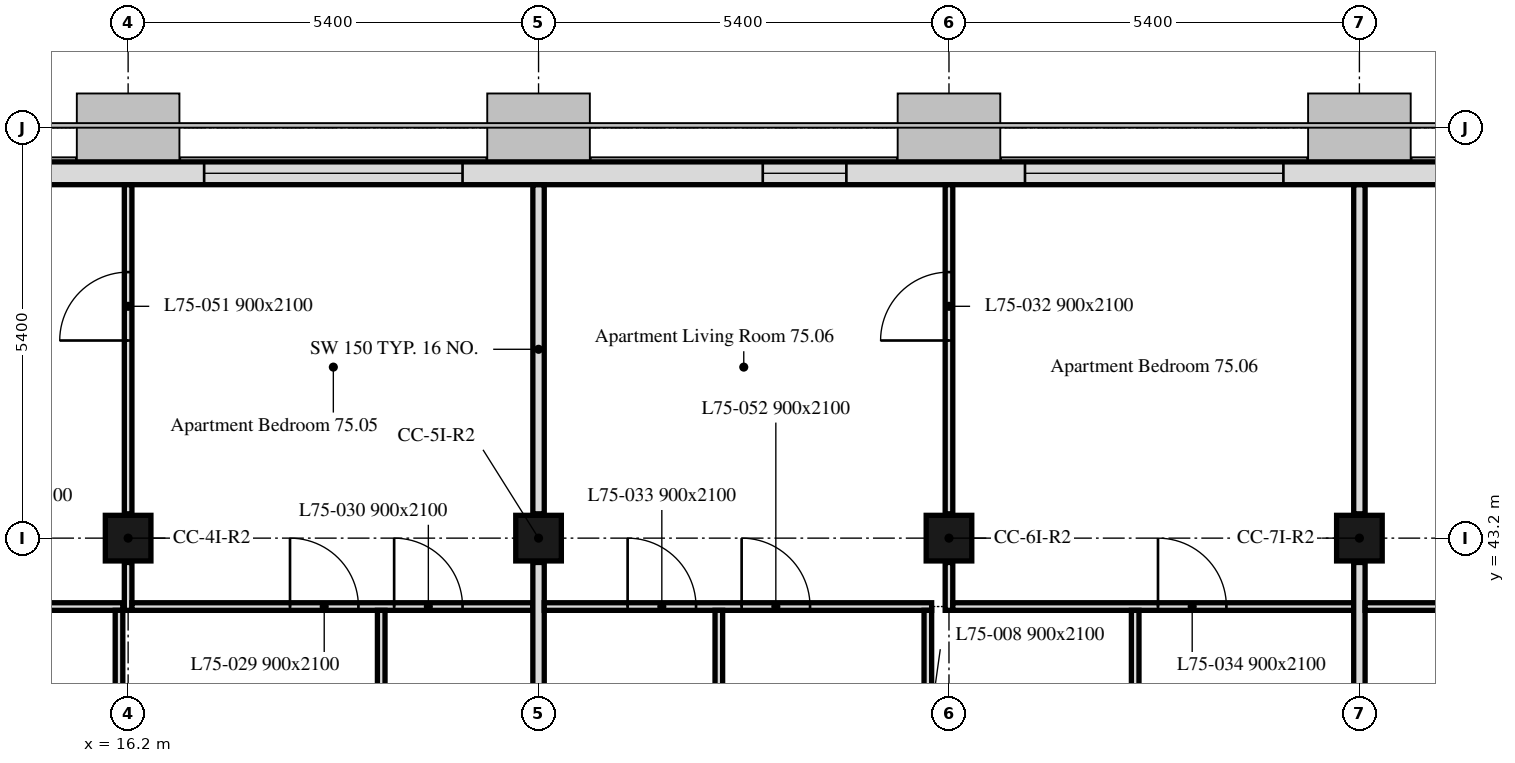
"""IFC4 building model, lengths in metres.
Left out: names, types, materials, properties, quantities, classifications, styles, units other than length and angle.
Written with IfcOpenShell. Run it as: python <this file> out.ifc"""

import sys

from ifc_helpers import new_model, si_unit, direction, frame, frame_2d, origin, origin_2d, place, context, subcontext, project, spatial, rectangle, extrude, element, fill, save


model = new_model("IFC4")
c1 = context("Model", 3, precision=1e-05, world=origin(), true_north=direction((0.0, 1.0)))
c2 = subcontext(c1, "Body", "Model", "MODEL_VIEW")
j1 = project(units=[si_unit("LENGTHUNIT", "METRE"), si_unit("PLANEANGLEUNIT", "RADIAN")], contexts=[c1])
p1 = place(None, origin())
s1 = spatial("IfcSite", under=j1, at=p1, CompositionType="ELEMENT")
p2 = place(p1, origin())
s2 = spatial("IfcBuilding", under=s1, at=p2, CompositionType="ELEMENT")
p3 = place(p2, frame((0.0, 0.0, 301.6)))
s3 = spatial("IfcBuildingStorey", under=s2, at=p3, CompositionType="ELEMENT", Elevation=301.6)
for number, where, z_axis, x_axis in (
    (1, (16.2, 43.2, 0.0), (0.0, 0.0, 1.0), (1.0, 0.0, 0.0)),
    (2, (21.6, 43.2, 0.0), (0.0, 0.0, 1.0), (1.0, 0.0, 0.0)),
    (3, (27.0, 43.2, 0.0), (0.0, 0.0, 1.0), (1.0, 0.0, 0.0)),
    (4, (32.4, 43.2, 0.0), (0.0, 0.0, 1.0), (1.0, 0.0, 0.0)),
):
    element("IfcColumn", number, at=place(p3, frame(where, z_axis=z_axis, x_axis=x_axis)), inside=s3, PredefinedType="COLUMN", context=c2, shape_type="SweptSolid", body=[
        extrude(rectangle(XDim=0.6, YDim=0.6, at=origin_2d()), origin(), (0.0, 0.0, 1.0), 3.0),
    ])
p4 = place(p3, frame((43.014, 48.0, 0.0), z_axis=(0.0, 0.0, 1.0), x_axis=(-1.0, 0.0, 0.0)))
e5 = element("IfcWall", 5, at=p4, inside=s3, PredefinedType="SOLIDWALL", context=c2, shape_type="SweptSolid", body=[
    extrude(rectangle(XDim=32.027, YDim=0.3, at=frame_2d((16.014, 0.0))), origin(), (0.0, 0.0, 1.0), 3.0),
])
p5 = place(p4, frame((0.814, 0.0, 0.9)))
e6 = element("IfcOpeningElement", 6, at=p5, cuts=e5, PredefinedType="OPENING", context=c2, shape_type="SweptSolid", body=[
    extrude(rectangle(XDim=3.4, YDim=1.7, at=frame_2d((1.7, 0.85))), frame((0.0, 0.16, 0.0), z_axis=(0.0, -1.0, 0.0), x_axis=(1.0, 0.0, 0.0)), (0.0, 0.0, 1.0), 0.32),
])
p6 = place(p4, frame((6.564, 0.0, 0.9)))
e7 = element("IfcOpeningElement", 7, at=p6, cuts=e5, PredefinedType="OPENING", context=c2, shape_type="SweptSolid", body=[
    extrude(rectangle(XDim=1.1, YDim=1.7, at=frame_2d((0.55, 0.85))), frame((0.0, 0.16, 0.0), z_axis=(0.0, -1.0, 0.0), x_axis=(1.0, 0.0, 0.0)), (0.0, 0.0, 1.0), 0.32),
])
p7 = place(p4, frame((11.614, 0.0, 0.9)))
e8 = element("IfcOpeningElement", 8, at=p7, cuts=e5, PredefinedType="OPENING", context=c2, shape_type="SweptSolid", body=[
    extrude(rectangle(XDim=3.4, YDim=1.7, at=frame_2d((1.7, 0.85))), frame((0.0, 0.16, 0.0), z_axis=(0.0, -1.0, 0.0), x_axis=(1.0, 0.0, 0.0)), (0.0, 0.0, 1.0), 0.32),
])
p8 = place(p4, frame((17.364, 0.0, 0.9)))
e9 = element("IfcOpeningElement", 9, at=p8, cuts=e5, PredefinedType="OPENING", context=c2, shape_type="SweptSolid", body=[
    extrude(rectangle(XDim=1.1, YDim=1.7, at=frame_2d((0.55, 0.85))), frame((0.0, 0.16, 0.0), z_axis=(0.0, -1.0, 0.0), x_axis=(1.0, 0.0, 0.0)), (0.0, 0.0, 1.0), 0.32),
])
p9 = place(p4, frame((22.414, 0.0, 0.9)))
e10 = element("IfcOpeningElement", 10, at=p9, cuts=e5, PredefinedType="OPENING", context=c2, shape_type="SweptSolid", body=[
    extrude(rectangle(XDim=3.4, YDim=1.7, at=frame_2d((1.7, 0.85))), frame((0.0, 0.16, 0.0), z_axis=(0.0, -1.0, 0.0), x_axis=(1.0, 0.0, 0.0)), (0.0, 0.0, 1.0), 0.32),
])
p10 = place(p4, frame((28.164, 0.0, 0.9)))
e11 = element("IfcOpeningElement", 11, at=p10, cuts=e5, PredefinedType="OPENING", context=c2, shape_type="SweptSolid", body=[
    extrude(rectangle(XDim=1.1, YDim=1.7, at=frame_2d((0.55, 0.85))), frame((0.0, 0.16, 0.0), z_axis=(0.0, -1.0, 0.0), x_axis=(1.0, 0.0, 0.0)), (0.0, 0.0, 1.0), 0.32),
])
p11 = place(p3, frame((6.151, 42.3, 0.0), z_axis=(0.0, 0.0, 1.0), x_axis=(1.0, 0.0, 0.0)))
e12 = element("IfcWall", 12, at=p11, inside=s3, PredefinedType="PARTITIONING", context=c2, shape_type="SweptSolid", body=[
    extrude(rectangle(XDim=9.979, YDim=0.1, at=frame_2d((4.99, 0.0))), origin(), (0.0, 0.0, 1.0), 3.0),
])
p12 = place(p11, frame((7.889, 0.0, 0.0)))
e13 = element("IfcOpeningElement", 13, at=p12, cuts=e12, PredefinedType="OPENING", context=c2, shape_type="SweptSolid", body=[
    extrude(rectangle(XDim=0.9, YDim=2.1, at=frame_2d((0.45, 1.05))), frame((0.0, 0.05, 0.0), z_axis=(0.0, -1.0, 0.0), x_axis=(1.0, 0.0, 0.0)), (0.0, 0.0, 1.0), 0.1),
])
p13 = place(p11, frame((1.019, 0.0, 0.0)))
e14 = element("IfcOpeningElement", 14, at=p13, cuts=e12, PredefinedType="OPENING", context=c2, shape_type="SweptSolid", body=[
    extrude(rectangle(XDim=0.9, YDim=2.1, at=frame_2d((0.45, 1.05))), frame((0.0, 0.05, 0.0), z_axis=(0.0, -1.0, 0.0), x_axis=(1.0, 0.0, 0.0)), (0.0, 0.0, 1.0), 0.1),
])
p14 = place(p11, frame((2.389, 0.0, 0.0)))
e15 = element("IfcOpeningElement", 15, at=p14, cuts=e12, PredefinedType="OPENING", context=c2, shape_type="SweptSolid", body=[
    extrude(rectangle(XDim=0.9, YDim=2.1, at=frame_2d((0.45, 1.05))), frame((0.0, 0.05, 0.0), z_axis=(0.0, -1.0, 0.0), x_axis=(1.0, 0.0, 0.0)), (0.0, 0.0, 1.0), 0.1),
])
p15 = place(p3, frame((16.2, 42.25, 0.0), z_axis=(0.0, 0.0, 1.0), x_axis=(0.0, 1.0, 0.0)))
e16 = element("IfcWall", 16, at=p15, inside=s3, PredefinedType="PARTITIONING", context=c2, shape_type="SweptSolid", body=[
    extrude(rectangle(XDim=0.63, YDim=0.1, at=frame_2d((0.315, 0.0))), origin(), (0.0, 0.0, 1.0), 2.4),
])
p16 = place(p3, frame((16.2, 43.52, 0.0), z_axis=(0.0, 0.0, 1.0), x_axis=(0.0, 1.0, 0.0)))
e17 = element("IfcWall", 17, at=p16, inside=s3, PredefinedType="PARTITIONING", context=c2, shape_type="SweptSolid", body=[
    extrude(rectangle(XDim=4.329, YDim=0.1, at=frame_2d((2.165, 0.0))), origin(), (0.0, 0.0, 1.0), 2.4),
])
p17 = place(p16, frame((2.28, 0.0, 0.0)))
e18 = element("IfcOpeningElement", 18, at=p17, cuts=e17, PredefinedType="OPENING", context=c2, shape_type="SweptSolid", body=[
    extrude(rectangle(XDim=0.9, YDim=2.1, at=frame_2d((0.45, 1.05))), frame((0.0, 0.05, 0.0), z_axis=(0.0, -1.0, 0.0), x_axis=(1.0, 0.0, 0.0)), (0.0, 0.0, 1.0), 0.1),
])
p18 = place(p3, frame((16.25, 42.3, 0.0), z_axis=(0.0, 0.0, 1.0), x_axis=(1.0, 0.0, 0.0)))
e19 = element("IfcWall", 19, at=p18, inside=s3, PredefinedType="PARTITIONING", context=c2, shape_type="SweptSolid", body=[
    extrude(rectangle(XDim=5.275, YDim=0.1, at=frame_2d((2.637, 0.0))), origin(), (0.0, 0.0, 1.0), 3.0),
])
p19 = place(p18, frame((2.08, 0.0, 0.0)))
e20 = element("IfcOpeningElement", 20, at=p19, cuts=e19, PredefinedType="OPENING", context=c2, shape_type="SweptSolid", body=[
    extrude(rectangle(XDim=0.9, YDim=2.1, at=frame_2d((0.45, 1.05))), frame((0.0, 0.05, 0.0), z_axis=(0.0, -1.0, 0.0), x_axis=(1.0, 0.0, 0.0)), (0.0, 0.0, 1.0), 0.1),
])
p20 = place(p18, frame((3.45, 0.0, 0.0)))
e21 = element("IfcOpeningElement", 21, at=p20, cuts=e19, PredefinedType="OPENING", context=c2, shape_type="SweptSolid", body=[
    extrude(rectangle(XDim=0.9, YDim=2.1, at=frame_2d((0.45, 1.05))), frame((0.0, 0.05, 0.0), z_axis=(0.0, -1.0, 0.0), x_axis=(1.0, 0.0, 0.0)), (0.0, 0.0, 1.0), 0.1),
])
p21 = place(p3, frame((21.6, 43.52, 0.0), z_axis=(0.0, 0.0, 1.0), x_axis=(0.0, 1.0, 0.0)))
e22 = element("IfcWall", 22, at=p21, inside=s3, PredefinedType="PARTITIONING", context=c2, shape_type="SweptSolid", body=[
    extrude(rectangle(XDim=4.329, YDim=0.15, at=frame_2d((2.165, 0.0))), origin(), (0.0, 0.0, 1.0), 2.4),
])
p22 = place(p3, frame((16.08, 38.12, 0.0), z_axis=(0.0, 0.0, 1.0), x_axis=(0.0, 1.0, 0.0)))
e23 = element("IfcWall", 23, at=p22, inside=s3, PredefinedType="PARTITIONING", context=c2, shape_type="SweptSolid", body=[
    extrude(rectangle(XDim=4.13, YDim=0.1, at=frame_2d((2.065, 0.0))), origin(), (0.0, 0.0, 1.0), 2.4),
])
p23 = place(p3, frame((19.53, 36.95, 0.0), z_axis=(0.0, 0.0, 1.0), x_axis=(0.0, 1.0, 0.0)))
e24 = element("IfcWall", 24, at=p23, inside=s3, PredefinedType="PARTITIONING", context=c2, shape_type="SweptSolid", body=[
    extrude(rectangle(XDim=5.3, YDim=0.1, at=frame_2d((2.65, 0.0))), origin(), (0.0, 0.0, 1.0), 3.0),
])
p24 = place(p3, frame((21.6, 38.12, 0.0), z_axis=(0.0, 0.0, 1.0), x_axis=(0.0, 1.0, 0.0)))
e25 = element("IfcWall", 25, at=p24, inside=s3, PredefinedType="PARTITIONING", context=c2, shape_type="SweptSolid", body=[
    extrude(rectangle(XDim=4.76, YDim=0.15, at=frame_2d((2.38, 0.0))), origin(), (0.0, 0.0, 1.0), 2.4),
])
p25 = place(p3, frame((21.675, 42.3, 0.0), z_axis=(0.0, 0.0, 1.0), x_axis=(1.0, 0.0, 0.0)))
e26 = element("IfcWall", 26, at=p25, inside=s3, PredefinedType="PARTITIONING", context=c2, shape_type="SweptSolid", body=[
    extrude(rectangle(XDim=5.097, YDim=0.1, at=frame_2d((2.548, 0.0))), origin(), (0.0, 0.0, 1.0), 3.0),
])
p26 = place(p25, frame((1.097, 0.0, 0.0)))
e27 = element("IfcOpeningElement", 27, at=p26, cuts=e26, PredefinedType="OPENING", context=c2, shape_type="SweptSolid", body=[
    extrude(rectangle(XDim=0.9, YDim=2.1, at=frame_2d((0.45, 1.05))), frame((0.0, 0.05, 0.0), z_axis=(0.0, -1.0, 0.0), x_axis=(1.0, 0.0, 0.0)), (0.0, 0.0, 1.0), 0.1),
])
p27 = place(p25, frame((2.597, 0.0, 0.0)))
e28 = element("IfcOpeningElement", 28, at=p27, cuts=e26, PredefinedType="OPENING", context=c2, shape_type="SweptSolid", body=[
    extrude(rectangle(XDim=0.9, YDim=2.1, at=frame_2d((0.45, 1.05))), frame((0.0, 0.05, 0.0), z_axis=(0.0, -1.0, 0.0), x_axis=(1.0, 0.0, 0.0)), (0.0, 0.0, 1.0), 0.1),
])
p28 = place(p3, frame((27.0, 42.25, 0.0), z_axis=(0.0, 0.0, 1.0), x_axis=(0.0, 1.0, 0.0)))
e29 = element("IfcWall", 29, at=p28, inside=s3, PredefinedType="PARTITIONING", context=c2, shape_type="SweptSolid", body=[
    extrude(rectangle(XDim=0.63, YDim=0.1, at=frame_2d((0.315, 0.0))), origin(), (0.0, 0.0, 1.0), 2.4),
])
p29 = place(p3, frame((27.0, 43.52, 0.0), z_axis=(0.0, 0.0, 1.0), x_axis=(0.0, 1.0, 0.0)))
e30 = element("IfcWall", 30, at=p29, inside=s3, PredefinedType="PARTITIONING", context=c2, shape_type="SweptSolid", body=[
    extrude(rectangle(XDim=4.329, YDim=0.1, at=frame_2d((2.165, 0.0))), origin(), (0.0, 0.0, 1.0), 2.4),
])
p30 = place(p29, frame((2.28, 0.0, 0.0)))
e31 = element("IfcOpeningElement", 31, at=p30, cuts=e30, PredefinedType="OPENING", context=c2, shape_type="SweptSolid", body=[
    extrude(rectangle(XDim=0.9, YDim=2.1, at=frame_2d((0.45, 1.05))), frame((0.0, 0.05, 0.0), z_axis=(0.0, -1.0, 0.0), x_axis=(1.0, 0.0, 0.0)), (0.0, 0.0, 1.0), 0.1),
])
p31 = place(p3, frame((27.05, 42.3, 0.0), z_axis=(0.0, 0.0, 1.0), x_axis=(1.0, 0.0, 0.0)))
e32 = element("IfcWall", 32, at=p31, inside=s3, PredefinedType="PARTITIONING", context=c2, shape_type="SweptSolid", body=[
    extrude(rectangle(XDim=5.275, YDim=0.1, at=frame_2d((2.637, 0.0))), origin(), (0.0, 0.0, 1.0), 3.0),
])
p32 = place(p31, frame((2.7, 0.0, 0.0)))
e33 = element("IfcOpeningElement", 33, at=p32, cuts=e32, PredefinedType="OPENING", context=c2, shape_type="SweptSolid", body=[
    extrude(rectangle(XDim=0.9, YDim=2.1, at=frame_2d((0.45, 1.05))), frame((0.0, 0.05, 0.0), z_axis=(0.0, -1.0, 0.0), x_axis=(1.0, 0.0, 0.0)), (0.0, 0.0, 1.0), 0.1),
])
p33 = place(p3, frame((32.4, 43.52, 0.0), z_axis=(0.0, 0.0, 1.0), x_axis=(0.0, 1.0, 0.0)))
e34 = element("IfcWall", 34, at=p33, inside=s3, PredefinedType="PARTITIONING", context=c2, shape_type="SweptSolid", body=[
    extrude(rectangle(XDim=4.329, YDim=0.15, at=frame_2d((2.165, 0.0))), origin(), (0.0, 0.0, 1.0), 2.4),
])
p34 = place(p3, frame((23.972, 34.275, 0.0), z_axis=(0.0, 0.0, 1.0), x_axis=(0.0, 1.0, 0.0)))
e35 = element("IfcWall", 35, at=p34, inside=s3, PredefinedType="PARTITIONING", context=c2, shape_type="SweptSolid", body=[
    extrude(rectangle(XDim=7.975, YDim=0.1, at=frame_2d((3.988, 0.0))), origin(), (0.0, 0.0, 1.0), 3.0),
])
p35 = place(p34, frame((0.825, 0.0, 0.0)))
e36 = element("IfcOpeningElement", 36, at=p35, cuts=e35, PredefinedType="OPENING", context=c2, shape_type="SweptSolid", body=[
    extrude(rectangle(XDim=0.9, YDim=2.1, at=frame_2d((0.45, 1.05))), frame((0.0, 0.05, 0.0), z_axis=(0.0, -1.0, 0.0), x_axis=(1.0, 0.0, 0.0)), (0.0, 0.0, 1.0), 0.1),
])
p36 = place(p34, frame((5.037, 0.0, 0.0)))
e37 = element("IfcOpeningElement", 37, at=p36, cuts=e35, PredefinedType="OPENING", context=c2, shape_type="SweptSolid", body=[
    extrude(rectangle(XDim=0.9, YDim=2.1, at=frame_2d((0.45, 1.05))), frame((0.0, 0.05, 0.0), z_axis=(0.0, -1.0, 0.0), x_axis=(1.0, 0.0, 0.0)), (0.0, 0.0, 1.0), 0.1),
])
p37 = place(p3, frame((26.722, 38.12, 0.0), z_axis=(0.0, 0.0, 1.0), x_axis=(0.0, 1.0, 0.0)))
e38 = element("IfcWall", 38, at=p37, inside=s3, PredefinedType="PARTITIONING", context=c2, shape_type="SweptSolid", body=[
    extrude(rectangle(XDim=4.13, YDim=0.1, at=frame_2d((2.065, 0.0))), origin(), (0.0, 0.0, 1.0), 3.0),
])
p38 = place(p37, frame((2.005, 0.0, 0.0)))
e39 = element("IfcOpeningElement", 39, at=p38, cuts=e38, PredefinedType="OPENING", context=c2, shape_type="SweptSolid", body=[
    extrude(rectangle(XDim=0.9, YDim=2.1, at=frame_2d((0.45, 1.05))), frame((0.0, 0.05, 0.0), z_axis=(0.0, -1.0, 0.0), x_axis=(1.0, 0.0, 0.0)), (0.0, 0.0, 1.0), 0.1),
])
p39 = place(p3, frame((29.45, 36.95, 0.0), z_axis=(0.0, 0.0, 1.0), x_axis=(0.0, 1.0, 0.0)))
e40 = element("IfcWall", 40, at=p39, inside=s3, PredefinedType="PARTITIONING", context=c2, shape_type="SweptSolid", body=[
    extrude(rectangle(XDim=5.3, YDim=0.1, at=frame_2d((2.65, 0.0))), origin(), (0.0, 0.0, 1.0), 3.0),
])
p40 = place(p3, frame((32.4, 38.12, 0.0), z_axis=(0.0, 0.0, 1.0), x_axis=(0.0, 1.0, 0.0)))
e41 = element("IfcWall", 41, at=p40, inside=s3, PredefinedType="PARTITIONING", context=c2, shape_type="SweptSolid", body=[
    extrude(rectangle(XDim=4.76, YDim=0.15, at=frame_2d((2.38, 0.0))), origin(), (0.0, 0.0, 1.0), 2.4),
])
p41 = place(p3, frame((32.475, 42.3, 0.0), z_axis=(0.0, 0.0, 1.0), x_axis=(1.0, 0.0, 0.0)))
e42 = element("IfcWall", 42, at=p41, inside=s3, PredefinedType="PARTITIONING", context=c2, shape_type="SweptSolid", body=[
    extrude(rectangle(XDim=5.21, YDim=0.1, at=frame_2d((2.605, 0.0))), origin(), (0.0, 0.0, 1.0), 3.0),
])
p42 = place(p41, frame((1.46, 0.0, 0.0)))
e43 = element("IfcOpeningElement", 43, at=p42, cuts=e42, PredefinedType="OPENING", context=c2, shape_type="SweptSolid", body=[
    extrude(rectangle(XDim=0.9, YDim=2.1, at=frame_2d((0.45, 1.05))), frame((0.0, 0.05, 0.0), z_axis=(0.0, -1.0, 0.0), x_axis=(1.0, 0.0, 0.0)), (0.0, 0.0, 1.0), 0.1),
])
p43 = place(p7, origin())
e44 = element("IfcWindow", 44, at=p43, inside=s3, PartitioningType="SINGLE_PANEL", PredefinedType="WINDOW", context=c2, shape_type="SweptSolid", body=[
    extrude(rectangle(XDim=3.4, YDim=1.7, at=frame_2d((1.7, 0.85))), frame((0.0, 0.03, 0.0), z_axis=(0.0, -1.0, 0.0), x_axis=(1.0, 0.0, 0.0)), (0.0, 0.0, 1.0), 0.06),
])
fill(e8, e44)
p44 = place(p8, origin())
e45 = element("IfcWindow", 45, at=p44, inside=s3, PartitioningType="SINGLE_PANEL", PredefinedType="WINDOW", context=c2, shape_type="SweptSolid", body=[
    extrude(rectangle(XDim=1.1, YDim=1.7, at=frame_2d((0.55, 0.85))), frame((0.0, 0.03, 0.0), z_axis=(0.0, -1.0, 0.0), x_axis=(1.0, 0.0, 0.0)), (0.0, 0.0, 1.0), 0.06),
])
fill(e9, e45)
p45 = place(p9, origin())
e46 = element("IfcWindow", 46, at=p45, inside=s3, PartitioningType="SINGLE_PANEL", PredefinedType="WINDOW", context=c2, shape_type="SweptSolid", body=[
    extrude(rectangle(XDim=3.4, YDim=1.7, at=frame_2d((1.7, 0.85))), frame((0.0, 0.03, 0.0), z_axis=(0.0, -1.0, 0.0), x_axis=(1.0, 0.0, 0.0)), (0.0, 0.0, 1.0), 0.06),
])
fill(e10, e46)
p46 = place(p19, origin())
e47 = element("IfcDoor", 47, at=p46, inside=s3, OperationType="SINGLE_SWING_LEFT", PredefinedType="DOOR", context=c2, shape_type="SweptSolid", body=[
    extrude(rectangle(XDim=0.9, YDim=2.1, at=frame_2d((0.45, 1.05))), frame((0.0, 0.025, 0.0), z_axis=(0.0, -1.0, 0.0), x_axis=(1.0, 0.0, 0.0)), (0.0, 0.0, 1.0), 0.05),
])
fill(e20, e47)
p47 = place(p20, origin())
e48 = element("IfcDoor", 48, at=p47, inside=s3, OperationType="SINGLE_SWING_RIGHT", PredefinedType="DOOR", context=c2, shape_type="SweptSolid", body=[
    extrude(rectangle(XDim=0.9, YDim=2.1, at=frame_2d((0.45, 1.05))), frame((0.0, 0.025, 0.0), z_axis=(0.0, -1.0, 0.0), x_axis=(1.0, 0.0, 0.0)), (0.0, 0.0, 1.0), 0.05),
])
fill(e21, e48)
p48 = place(p30, origin())
e49 = element("IfcDoor", 49, at=p48, inside=s3, OperationType="SINGLE_SWING_LEFT", PredefinedType="DOOR", context=c2, shape_type="SweptSolid", body=[
    extrude(rectangle(XDim=0.9, YDim=2.1, at=frame_2d((0.45, 1.05))), frame((0.0, 0.025, 0.0), z_axis=(0.0, -1.0, 0.0), x_axis=(1.0, 0.0, 0.0)), (0.0, 0.0, 1.0), 0.05),
])
fill(e31, e49)
p49 = place(p26, origin())
e50 = element("IfcDoor", 50, at=p49, inside=s3, OperationType="SINGLE_SWING_LEFT", PredefinedType="DOOR", context=c2, shape_type="SweptSolid", body=[
    extrude(rectangle(XDim=0.9, YDim=2.1, at=frame_2d((0.45, 1.05))), frame((0.0, 0.025, 0.0), z_axis=(0.0, -1.0, 0.0), x_axis=(1.0, 0.0, 0.0)), (0.0, 0.0, 1.0), 0.05),
])
fill(e27, e50)
p50 = place(p32, origin())
e51 = element("IfcDoor", 51, at=p50, inside=s3, OperationType="SINGLE_SWING_RIGHT", PredefinedType="DOOR", context=c2, shape_type="SweptSolid", body=[
    extrude(rectangle(XDim=0.9, YDim=2.1, at=frame_2d((0.45, 1.05))), frame((0.0, 0.025, 0.0), z_axis=(0.0, -1.0, 0.0), x_axis=(1.0, 0.0, 0.0)), (0.0, 0.0, 1.0), 0.05),
])
fill(e33, e51)
p51 = place(p17, origin())
e52 = element("IfcDoor", 52, at=p51, inside=s3, OperationType="SINGLE_SWING_LEFT", PredefinedType="DOOR", context=c2, shape_type="SweptSolid", body=[
    extrude(rectangle(XDim=0.9, YDim=2.1, at=frame_2d((0.45, 1.05))), frame((0.0, 0.025, 0.0), z_axis=(0.0, -1.0, 0.0), x_axis=(1.0, 0.0, 0.0)), (0.0, 0.0, 1.0), 0.05),
])
fill(e18, e52)
p52 = place(p27, origin())
e53 = element("IfcDoor", 53, at=p52, inside=s3, OperationType="SINGLE_SWING_RIGHT", PredefinedType="DOOR", context=c2, shape_type="SweptSolid", body=[
    extrude(rectangle(XDim=0.9, YDim=2.1, at=frame_2d((0.45, 1.05))), frame((0.0, 0.025, 0.0), z_axis=(0.0, -1.0, 0.0), x_axis=(1.0, 0.0, 0.0)), (0.0, 0.0, 1.0), 0.05),
])
fill(e28, e53)
save(model, sys.argv[1])
